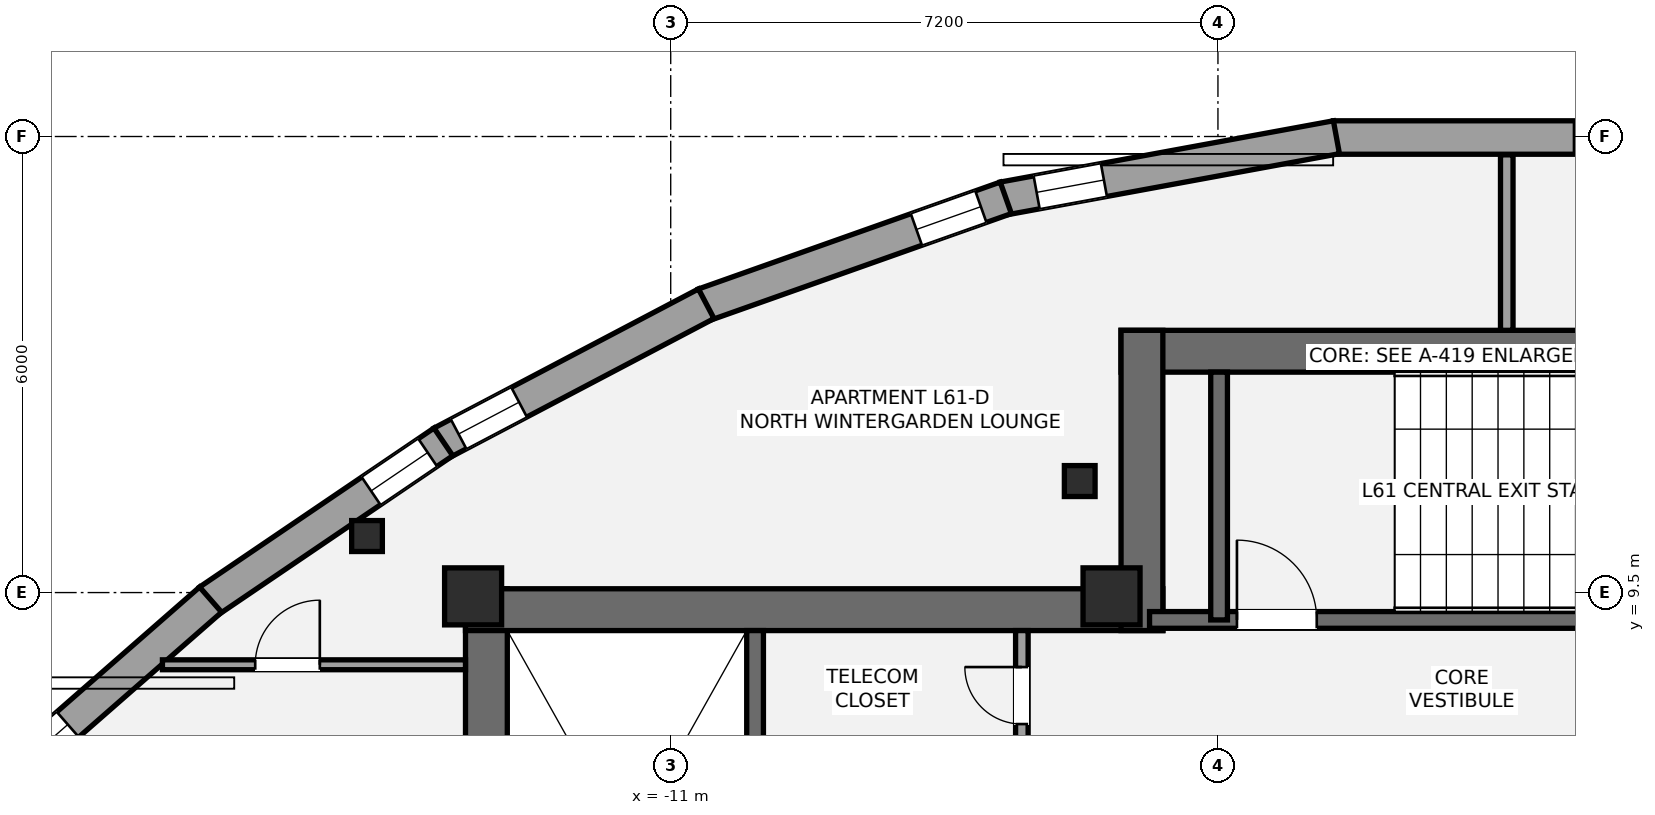
"""IFC4 building model, lengths in metres.
Left out: names, types, materials, properties, quantities, classifications, styles, units other than length and angle.
Written with IfcOpenShell. Run it as: python <this file> out.ifc"""

import sys

from ifc_helpers import new_model, si_unit, direction, frame, frame_2d, origin, origin_2d, place, context, subcontext, project, spatial, rectangle, i_section, extrude, element, fill, save


model = new_model("IFC4")
c1 = context("Model", 3, precision=1e-05, world=origin(), true_north=direction((0.0, 1.0)))
c2 = subcontext(c1, "Body", "Model", "MODEL_VIEW")
j1 = project(units=[si_unit("LENGTHUNIT", "METRE"), si_unit("PLANEANGLEUNIT", "RADIAN")], contexts=[c1])
p1 = place(None, origin())
s1 = spatial("IfcSite", under=j1, at=p1, CompositionType="ELEMENT")
p2 = place(p1, origin())
s2 = spatial("IfcBuilding", under=s1, at=p2, CompositionType="ELEMENT")
p3 = place(p2, frame((0.0, 0.0, 219.45)))
s3 = spatial("IfcBuildingStorey", under=s2, at=p3, CompositionType="ELEMENT", Elevation=219.45)
p4 = place(p3, frame((-13.425, 1.3, 0.0), z_axis=(0.0, 0.0, 1.0), x_axis=(0.0, 1.0, 0.0)))
e1 = element("IfcWall", 1, at=p4, inside=s3, PredefinedType="SHEAR", context=c2, shape_type="SweptSolid", body=[
    extrude(rectangle(XDim=8.25, YDim=0.55, at=frame_2d((4.125, 0.0))), origin(), (0.0, 0.0, 1.0), 3.15),
])
p5 = place(p3, frame((-13.7, 9.275, 0.0), z_axis=(0.0, 0.0, 1.0), x_axis=(1.0, 0.0, 0.0)))
e2 = element("IfcWall", 2, at=p5, inside=s3, PredefinedType="SHEAR", context=c2, shape_type="SweptSolid", body=[
    extrude(rectangle(XDim=9.175, YDim=0.55, at=frame_2d((4.587, 0.0))), origin(), (0.0, 0.0, 1.0), 3.15),
])
p6 = place(p3, frame((-9.89, 1.85, 0.0), z_axis=(0.0, 0.0, 1.0), x_axis=(0.0, 1.0, 0.0)))
e3 = element("IfcWall", 3, at=p6, inside=s3, PredefinedType="SHEAR", context=c2, shape_type="SweptSolid", body=[
    extrude(rectangle(XDim=7.15, YDim=0.22, at=frame_2d((3.575, 0.0))), origin(), (0.0, 0.0, 1.0), 3.15),
])
p7 = place(p3, frame((-5.075, 12.675, 0.0), z_axis=(0.0, 0.0, 1.0), x_axis=(1.0, 0.0, 0.0)))
e4 = element("IfcWall", 4, at=p7, inside=s3, PredefinedType="SHEAR", context=c2, shape_type="SweptSolid", body=[
    extrude(rectangle(XDim=10.15, YDim=0.55, at=frame_2d((5.075, 0.0))), origin(), (0.0, 0.0, 1.0), 3.15),
])
p8 = place(p3, frame((-4.8, 9.0, 0.0), z_axis=(0.0, 0.0, 1.0), x_axis=(0.0, 1.0, 0.0)))
e5 = element("IfcWall", 5, at=p8, inside=s3, PredefinedType="SHEAR", context=c2, shape_type="SweptSolid", body=[
    extrude(rectangle(XDim=3.95, YDim=0.55, at=frame_2d((1.975, 0.0))), origin(), (0.0, 0.0, 1.0), 3.15),
])
p9 = place(p3, frame((-4.7, 9.14, 0.0), z_axis=(0.0, 0.0, 1.0), x_axis=(1.0, 0.0, 0.0)))
e6 = element("IfcWall", 6, at=p9, inside=s3, PredefinedType="SHEAR", context=c2, shape_type="SweptSolid", body=[
    extrude(rectangle(XDim=9.3, YDim=0.22, at=frame_2d((4.65, 0.0))), origin(), (0.0, 0.0, 1.0), 3.15),
])
p10 = place(p9, frame((1.15, 0.0, 0.0)))
e7 = element("IfcOpeningElement", 7, at=p10, cuts=e6, PredefinedType="OPENING", context=c2, shape_type="SweptSolid", body=[
    extrude(rectangle(XDim=1.05, YDim=2.15, at=frame_2d((0.525, 1.075))), frame((0.0, 0.12, 0.0), z_axis=(0.0, -1.0, 0.0), x_axis=(1.0, 0.0, 0.0)), (0.0, 0.0, 1.0), 0.24),
])
p11 = place(p3, frame((-3.785, 9.14, 0.0), z_axis=(0.0, 0.0, 1.0), x_axis=(0.0, 1.0, 0.0)))
e8 = element("IfcWall", 8, at=p11, inside=s3, PredefinedType="SHEAR", context=c2, shape_type="SweptSolid", body=[
    extrude(rectangle(XDim=3.26, YDim=0.22, at=frame_2d((1.63, 0.0))), origin(), (0.0, 0.0, 1.0), 3.15),
])
for number, where, z_axis, x_axis in (
    (9, (-13.6, 9.45, 0.0), (0.0, 0.0, 1.0), (1.0, 0.0, 0.0)),
    (10, (-5.2, 9.45, 0.0), (0.0, 0.0, 1.0), (1.0, 0.0, 0.0)),
):
    element("IfcColumn", number, at=place(p3, frame(where, z_axis=z_axis, x_axis=x_axis)), inside=s3, PredefinedType="PILASTER", context=c2, shape_type="SweptSolid", body=[
        extrude(rectangle(XDim=0.75, YDim=0.75, at=origin_2d()), origin(), (0.0, 0.0, 1.0), 3.15),
    ])
for number, where, z_axis, x_axis in (
    (11, (-5.619, 10.967, 0.0), (0.0, 0.0, 1.0), (1.0, 0.0, 0.0)),
    (12, (-14.996, 10.244, 0.0), (0.0, 0.0, 1.0), (1.0, 0.0, 0.0)),
):
    element("IfcColumn", number, at=place(p3, frame(where, z_axis=z_axis, x_axis=x_axis)), inside=s3, PredefinedType="COLUMN", context=c2, shape_type="SweptSolid", body=[
        extrude(i_section(OverallWidth=0.404, OverallDepth=0.407, WebThickness=0.027, FlangeThickness=0.044, at=origin_2d()), origin(), (0.0, 0.0, 1.0), 3.15),
    ])
p12 = place(p3, frame((-2.281, 15.487, 0.0), z_axis=(0.0, 0.0, 1.0), x_axis=(1.0, 0.0, 0.0)))
e13 = element("IfcWall", 13, at=p12, inside=s3, PredefinedType="STANDARD", context=c2, shape_type="SweptSolid", body=[
    extrude(rectangle(XDim=4.562, YDim=0.44, at=frame_2d((2.281, 0.0))), origin(), (0.0, 0.0, 1.0), 2.336),
])
p13 = place(p12, frame((3.166, 0.0, 0.58)))
e14 = element("IfcOpeningElement", 14, at=p13, cuts=e13, PredefinedType="OPENING", context=c2, shape_type="SweptSolid", body=[
    extrude(rectangle(XDim=0.9, YDim=1.35, at=frame_2d((0.45, 0.675))), frame((0.0, 0.23, 0.0), z_axis=(0.0, -1.0, 0.0), x_axis=(1.0, 0.0, 0.0)), (0.0, 0.0, 1.0), 0.46),
])
p14 = place(p3, frame((-6.625, 14.684, 0.0), z_axis=(0.0, 0.0, 1.0), x_axis=(0.983508612793, 0.180861296472, 0.0)))
e15 = element("IfcWall", 15, at=p14, inside=s3, PredefinedType="STANDARD", context=c2, shape_type="SweptSolid", body=[
    extrude(rectangle(XDim=4.457, YDim=0.44, at=frame_2d((2.229, 0.0))), origin(), (0.0, 0.0, 1.0), 2.336),
])
p15 = place(p14, frame((0.447, 0.0, 0.58)))
e16 = element("IfcOpeningElement", 16, at=p15, cuts=e15, PredefinedType="OPENING", context=c2, shape_type="SweptSolid", body=[
    extrude(rectangle(XDim=0.9, YDim=1.35, at=frame_2d((0.45, 0.675))), frame((0.0, 0.23, 0.0), z_axis=(0.0, -1.0, 0.0), x_axis=(1.0, 0.0, 0.0)), (0.0, 0.0, 1.0), 0.46),
])
p16 = place(p3, frame((-10.562, 13.287, 0.0), z_axis=(0.0, 0.0, 1.0), x_axis=(0.942617344196, 0.333875040128, 0.0)))
e17 = element("IfcWall", 17, at=p16, inside=s3, PredefinedType="STANDARD", context=c2, shape_type="SweptSolid", body=[
    extrude(rectangle(XDim=4.212, YDim=0.44, at=frame_2d((2.106, 0.0))), origin(), (0.0, 0.0, 1.0), 2.336),
])
p17 = place(p16, frame((2.964, 0.0, 0.58)))
e18 = element("IfcOpeningElement", 18, at=p17, cuts=e17, PredefinedType="OPENING", context=c2, shape_type="SweptSolid", body=[
    extrude(rectangle(XDim=0.9, YDim=1.35, at=frame_2d((0.45, 0.675))), frame((0.0, 0.23, 0.0), z_axis=(0.0, -1.0, 0.0), x_axis=(1.0, 0.0, 0.0)), (0.0, 0.0, 1.0), 0.46),
])
p18 = place(p3, frame((-14.012, 11.469, 0.0), z_axis=(0.0, 0.0, 1.0), x_axis=(0.885047506895, 0.465500709493, 0.0)))
e19 = element("IfcWall", 19, at=p18, inside=s3, PredefinedType="STANDARD", context=c2, shape_type="SweptSolid", body=[
    extrude(rectangle(XDim=3.931, YDim=0.44, at=frame_2d((1.966, 0.0))), origin(), (0.0, 0.0, 1.0), 2.336),
])
p19 = place(p18, frame((0.25, 0.0, 0.58)))
e20 = element("IfcOpeningElement", 20, at=p19, cuts=e19, PredefinedType="OPENING", context=c2, shape_type="SweptSolid", body=[
    extrude(rectangle(XDim=0.9, YDim=1.35, at=frame_2d((0.45, 0.675))), frame((0.0, 0.23, 0.0), z_axis=(0.0, -1.0, 0.0), x_axis=(1.0, 0.0, 0.0)), (0.0, 0.0, 1.0), 0.46),
])
p20 = place(p3, frame((-17.075, 9.39, 0.0), z_axis=(0.0, 0.0, 1.0), x_axis=(0.827609463482, 0.56130435234, 0.0)))
e21 = element("IfcWall", 21, at=p20, inside=s3, PredefinedType="STANDARD", context=c2, shape_type="SweptSolid", body=[
    extrude(rectangle(XDim=3.727, YDim=0.44, at=frame_2d((1.863, 0.0))), origin(), (0.0, 0.0, 1.0), 2.336),
])
p21 = place(p20, frame((2.577, 0.0, 0.42)))
e22 = element("IfcOpeningElement", 22, at=p21, cuts=e21, PredefinedType="OPENING", context=c2, shape_type="SweptSolid", body=[
    extrude(rectangle(XDim=0.9, YDim=1.35, at=frame_2d((0.45, 0.675))), frame((0.0, 0.23, 0.0), z_axis=(0.0, -1.0, 0.0), x_axis=(1.0, 0.0, 0.0)), (0.0, 0.0, 1.0), 0.46),
])
p22 = place(p3, frame((-19.752, 7.047, 0.0), z_axis=(0.0, 0.0, 1.0), x_axis=(0.752758077019, 0.658297256172, 0.0)))
e23 = element("IfcWall", 23, at=p22, inside=s3, PredefinedType="STANDARD", context=c2, shape_type="SweptSolid", body=[
    extrude(rectangle(XDim=3.585, YDim=0.44, at=frame_2d((1.792, 0.0))), origin(), (0.0, 0.0, 1.0), 2.336),
])
p23 = place(p22, frame((0.189, 0.0, 0.42)))
e24 = element("IfcOpeningElement", 24, at=p23, cuts=e23, PredefinedType="OPENING", context=c2, shape_type="SweptSolid", body=[
    extrude(rectangle(XDim=0.9, YDim=1.35, at=frame_2d((0.45, 0.675))), frame((0.0, 0.23, 0.0), z_axis=(0.0, -1.0, 0.0), x_axis=(1.0, 0.0, 0.0)), (0.0, 0.0, 1.0), 0.46),
])
p24 = place(p3, frame((-6.38, 7.42, 0.0), z_axis=(0.0, 0.0, 1.0), x_axis=(0.0, 1.0, 0.0)))
e25 = element("IfcWall", 25, at=p24, inside=s3, PredefinedType="PARTITIONING", context=c2, shape_type="SweptSolid", body=[
    extrude(rectangle(XDim=1.58, YDim=0.165, at=frame_2d((0.79, 0.0))), origin(), (0.0, 0.0, 1.0), 2.97),
])
p25 = place(p24, frame((0.35, 0.0, 0.0)))
e26 = element("IfcOpeningElement", 26, at=p25, cuts=e25, PredefinedType="OPENING", context=c2, shape_type="SweptSolid", body=[
    extrude(rectangle(XDim=0.75, YDim=2.1, at=frame_2d((0.375, 1.05))), frame((0.0, 0.093, 0.0), z_axis=(0.0, -1.0, 0.0), x_axis=(1.0, 0.0, 0.0)), (0.0, 0.0, 1.0), 0.185),
])
p26 = place(p3, frame((0.0, 12.95, 0.0), z_axis=(0.0, 0.0, 1.0), x_axis=(0.0, 1.0, 0.0)))
e27 = element("IfcWall", 27, at=p26, inside=s3, PredefinedType="PARTITIONING", context=c2, shape_type="SweptSolid", body=[
    extrude(rectangle(XDim=2.309, YDim=0.165, at=frame_2d((1.154, 0.0))), origin(), (0.0, 0.0, 1.0), 2.97),
])
p27 = place(p3, frame((-17.688, 8.55, 0.0), z_axis=(0.0, 0.0, 1.0), x_axis=(1.0, 0.0, 0.0)))
e28 = element("IfcWall", 28, at=p27, inside=s3, PredefinedType="PARTITIONING", context=c2, shape_type="SweptSolid", body=[
    extrude(rectangle(XDim=3.988, YDim=0.13, at=frame_2d((1.994, 0.0))), origin(), (0.0, 0.0, 1.0), 2.423),
])
p28 = place(p27, frame((1.221, 0.0, 0.0)))
e29 = element("IfcOpeningElement", 29, at=p28, cuts=e28, PredefinedType="OPENING", context=c2, shape_type="SweptSolid", body=[
    extrude(rectangle(XDim=0.85, YDim=2.1, at=frame_2d((0.425, 1.05))), frame((0.0, 0.075, 0.0), z_axis=(0.0, -1.0, 0.0), x_axis=(1.0, 0.0, 0.0)), (0.0, 0.0, 1.0), 0.15),
])
p29 = place(p13, origin())
e30 = element("IfcWindow", 30, at=p29, inside=s3, PartitioningType="SINGLE_PANEL", PredefinedType="WINDOW", context=c2, shape_type="SweptSolid", body=[
    extrude(rectangle(XDim=0.9, YDim=1.35, at=frame_2d((0.45, 0.675))), frame((0.0, -0.01, 0.0), z_axis=(0.0, -1.0, 0.0), x_axis=(1.0, 0.0, 0.0)), (0.0, 0.0, 1.0), 0.06),
])
fill(e14, e30)
p30 = place(p15, origin())
e31 = element("IfcWindow", 31, at=p30, inside=s3, PartitioningType="SINGLE_PANEL", PredefinedType="WINDOW", context=c2, shape_type="SweptSolid", body=[
    extrude(rectangle(XDim=0.9, YDim=1.35, at=frame_2d((0.45, 0.675))), frame((0.0, -0.01, 0.0), z_axis=(0.0, -1.0, 0.0), x_axis=(1.0, 0.0, 0.0)), (0.0, 0.0, 1.0), 0.06),
])
fill(e16, e31)
p31 = place(p17, origin())
e32 = element("IfcWindow", 32, at=p31, inside=s3, PartitioningType="SINGLE_PANEL", PredefinedType="WINDOW", context=c2, shape_type="SweptSolid", body=[
    extrude(rectangle(XDim=0.9, YDim=1.35, at=frame_2d((0.45, 0.675))), frame((0.0, -0.01, 0.0), z_axis=(0.0, -1.0, 0.0), x_axis=(1.0, 0.0, 0.0)), (0.0, 0.0, 1.0), 0.06),
])
fill(e18, e32)
p32 = place(p19, origin())
e33 = element("IfcWindow", 33, at=p32, inside=s3, PartitioningType="SINGLE_PANEL", PredefinedType="WINDOW", context=c2, shape_type="SweptSolid", body=[
    extrude(rectangle(XDim=0.9, YDim=1.35, at=frame_2d((0.45, 0.675))), frame((0.0, -0.01, 0.0), z_axis=(0.0, -1.0, 0.0), x_axis=(1.0, 0.0, 0.0)), (0.0, 0.0, 1.0), 0.06),
])
fill(e20, e33)
p33 = place(p21, origin())
e34 = element("IfcWindow", 34, at=p33, inside=s3, PartitioningType="SINGLE_PANEL", PredefinedType="WINDOW", context=c2, shape_type="SweptSolid", body=[
    extrude(rectangle(XDim=0.9, YDim=1.35, at=frame_2d((0.45, 0.675))), frame((0.0, -0.01, 0.0), z_axis=(0.0, -1.0, 0.0), x_axis=(1.0, 0.0, 0.0)), (0.0, 0.0, 1.0), 0.06),
])
fill(e22, e34)
p34 = place(p23, origin())
e35 = element("IfcWindow", 35, at=p34, inside=s3, PartitioningType="SINGLE_PANEL", PredefinedType="WINDOW", context=c2, shape_type="SweptSolid", body=[
    extrude(rectangle(XDim=0.9, YDim=1.35, at=frame_2d((0.45, 0.675))), frame((0.0, -0.01, 0.0), z_axis=(0.0, -1.0, 0.0), x_axis=(1.0, 0.0, 0.0)), (0.0, 0.0, 1.0), 0.06),
])
fill(e24, e35)
p35 = place(p10, origin())
e36 = element("IfcDoor", 36, at=p35, inside=s3, OperationType="SINGLE_SWING_LEFT", PredefinedType="DOOR", context=c2, shape_type="SweptSolid", body=[
    extrude(rectangle(XDim=1.05, YDim=2.15, at=frame_2d((0.525, 1.075))), frame((0.0, 0.025, 0.0), z_axis=(0.0, -1.0, 0.0), x_axis=(1.0, 0.0, 0.0)), (0.0, 0.0, 1.0), 0.05),
])
fill(e7, e36)
p36 = place(p25, origin())
e37 = element("IfcDoor", 37, at=p36, inside=s3, OperationType="SINGLE_SWING_RIGHT", PredefinedType="DOOR", context=c2, shape_type="SweptSolid", body=[
    extrude(rectangle(XDim=0.75, YDim=2.1, at=frame_2d((0.375, 1.05))), frame((0.0, 0.025, 0.0), z_axis=(0.0, -1.0, 0.0), x_axis=(1.0, 0.0, 0.0)), (0.0, 0.0, 1.0), 0.05),
])
fill(e26, e37)
p37 = place(p28, origin())
e38 = element("IfcDoor", 38, at=p37, inside=s3, OperationType="SINGLE_SWING_RIGHT", PredefinedType="DOOR", context=c2, shape_type="SweptSolid", body=[
    extrude(rectangle(XDim=0.85, YDim=2.1, at=frame_2d((0.425, 1.05))), frame((0.0, 0.025, 0.0), z_axis=(0.0, -1.0, 0.0), x_axis=(1.0, 0.0, 0.0)), (0.0, 0.0, 1.0), 0.05),
])
fill(e29, e38)
save(model, sys.argv[1])
